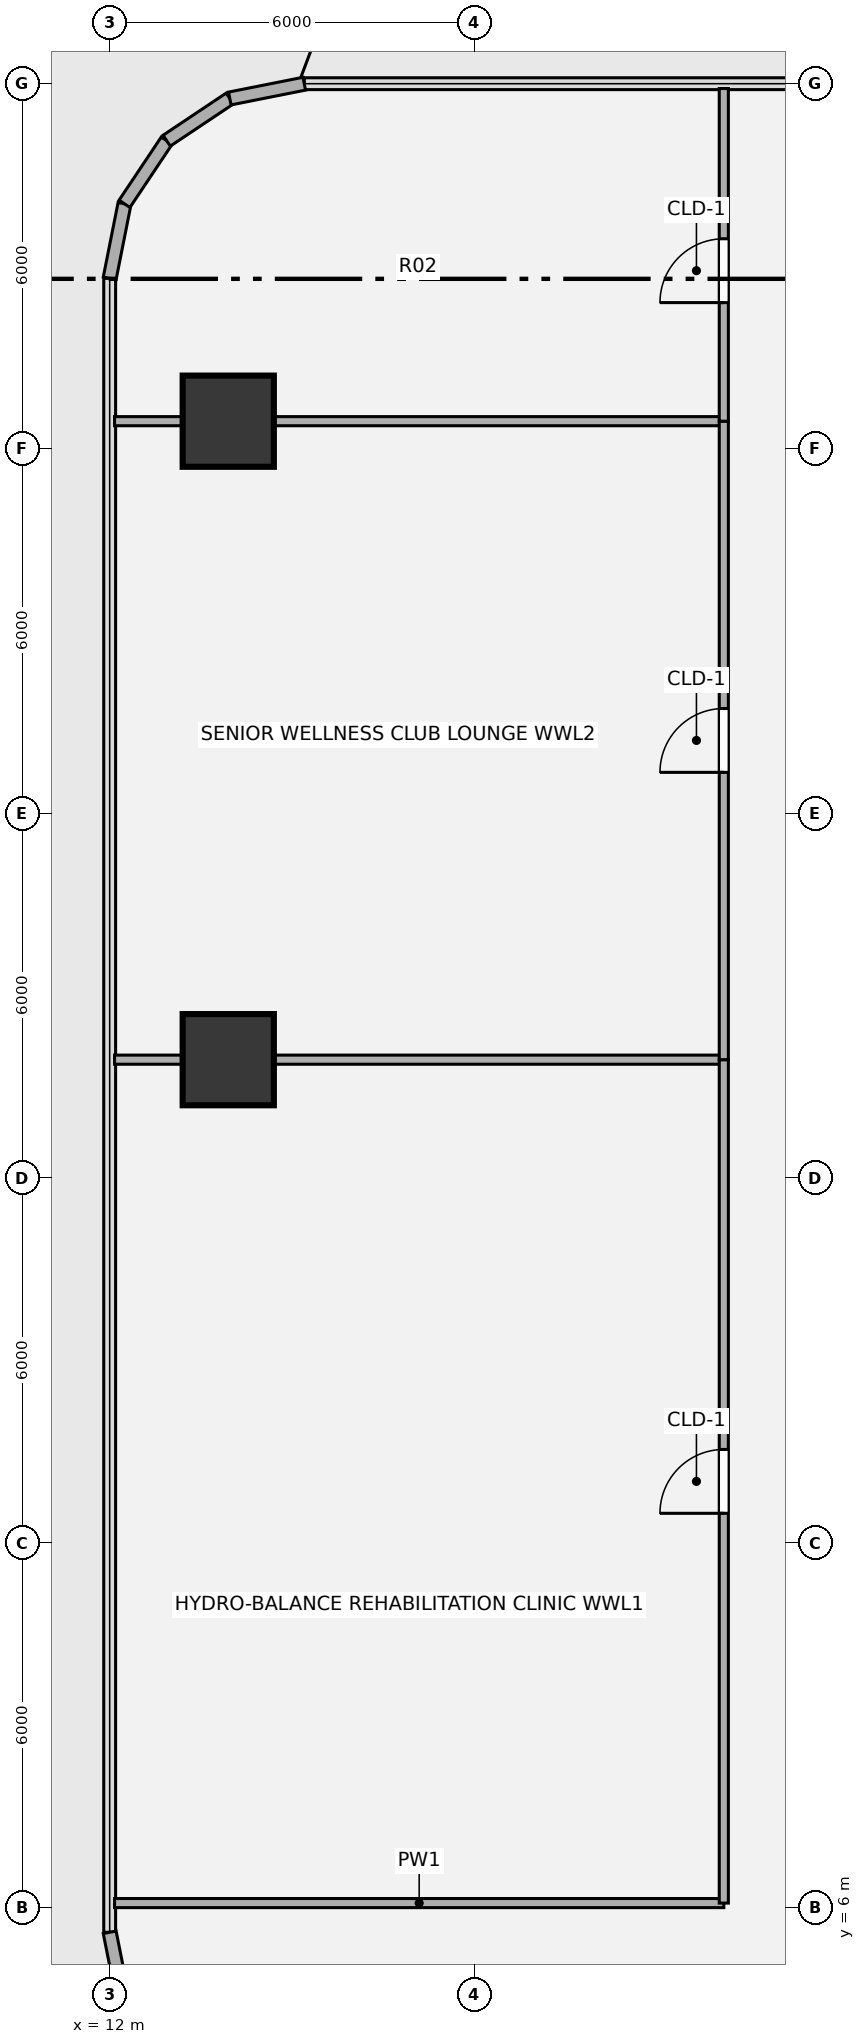
"""IFC4 building model, lengths in metres.
Left out: names, types, materials, properties, quantities, classifications, styles, units other than length and angle.
Written with IfcOpenShell. Run it as: python <this file> out.ifc"""

import sys

from ifc_helpers import new_model, si_unit, direction, frame, frame_2d, origin, origin_2d, place, context, subcontext, project, spatial, rectangle, hollow_circle, extrude, source, transform, mapped, element, fill, save


model = new_model("IFC4")
c1 = context("Model", 3, precision=1e-05, world=origin(), true_north=direction((0.0, 1.0)))
c2 = subcontext(c1, "Body", "Model", "MODEL_VIEW")
j1 = project(units=[si_unit("LENGTHUNIT", "METRE"), si_unit("PLANEANGLEUNIT", "RADIAN")], contexts=[c1])
p1 = place(None, origin())
s1 = spatial("IfcSite", under=j1, at=p1, CompositionType="ELEMENT")
p2 = place(p1, origin())
s2 = spatial("IfcBuilding", under=s1, at=p2, CompositionType="ELEMENT")
p3 = place(p2, frame((0.0, 0.0, 27.0)))
s3 = spatial("IfcBuildingStorey", under=s2, at=p3, CompositionType="ELEMENT", Elevation=27.0)
m1 = source(origin(), c2, "Body", "SweptSolid", [
    extrude(hollow_circle(Radius=0.75, WallThickness=0.05, at=origin_2d()), origin(), (0.0, 0.0, 1.0), 3.78),
])
for number, where, z_axis, x_axis in (
    (1, (13.95, 19.95, 0.0), (0.0, 0.0, 1.0), (1.0, 0.0, 0.0)),
    (2, (13.95, 30.45, 0.0), (0.0, 0.0, 1.0), (1.0, 0.0, 0.0)),
):
    element("IfcColumn", number, at=place(p3, frame(where, z_axis=z_axis, x_axis=x_axis)), inside=s3, PredefinedType="COLUMN", context=c2, shape_type="MappedRepresentation", body=[
        mapped(m1, transform((0.0, 0.0, 0.0), x_axis=(1.0, 0.0, 0.0), y_axis=(0.0, 1.0, 0.0), z_axis=(0.0, 0.0, 1.0), scale=1.0)),
    ])
for number, where, z_axis, x_axis in (
    (3, (12.244, 4.375, 0.0), (0.0, 0.0, 1.0), (-0.195, 0.981, 0.0)),
    (4, (12.0, 32.8, 0.0), (0.0, 0.0, 1.0), (0.195, 0.981, 0.0)),
    (5, (12.244, 34.025, 0.0), (0.0, 0.0, 1.0), (0.556, 0.831, 0.0)),
    (6, (12.937, 35.063, 0.0), (0.0, 0.0, 1.0), (0.831, 0.556, 0.0)),
    (7, (13.975, 35.756, 0.0), (0.0, 0.0, 1.0), (0.981, 0.195, 0.0)),
):
    element("IfcWall", number, at=place(p3, frame(where, z_axis=z_axis, x_axis=x_axis)), inside=s3, PredefinedType="SOLIDWALL", context=c2, shape_type="SweptSolid", body=[
        extrude(rectangle(XDim=1.249, YDim=0.215, at=frame_2d((0.624, 0.0))), origin(), (0.0, 0.0, 1.0), 3.53),
    ])
p4 = place(p3, frame((12.08, 6.08, 0.0), z_axis=(0.0, 0.0, 1.0), x_axis=(1.0, 0.0, 0.0)))
e8 = element("IfcWall", 8, at=p4, inside=s3, PredefinedType="PARTITIONING", context=c2, shape_type="SweptSolid", body=[
    extrude(rectangle(XDim=10.02, YDim=0.15, at=frame_2d((5.01, 0.0))), origin(), (0.0, 0.0, 1.0), 3.5),
])
p5 = place(p3, frame((12.08, 19.95, 0.0), z_axis=(0.0, 0.0, 1.0), x_axis=(1.0, 0.0, 0.0)))
e9 = element("IfcWall", 9, at=p5, inside=s3, PredefinedType="PARTITIONING", context=c2, shape_type="SweptSolid", body=[
    extrude(rectangle(XDim=10.02, YDim=0.15, at=frame_2d((5.01, 0.0))), origin(), (0.0, 0.0, 1.0), 2.715),
])
p6 = place(p3, frame((12.08, 30.45, 0.0), z_axis=(0.0, 0.0, 1.0), x_axis=(1.0, 0.0, 0.0)))
e10 = element("IfcWall", 10, at=p6, inside=s3, PredefinedType="PARTITIONING", context=c2, shape_type="SweptSolid", body=[
    extrude(rectangle(XDim=10.02, YDim=0.15, at=frame_2d((5.01, 0.0))), origin(), (0.0, 0.0, 1.0), 2.903),
])
p7 = place(p3, frame((22.1, 6.08, 0.0), z_axis=(0.0, 0.0, 1.0), x_axis=(0.0, 1.0, 0.0)))
e11 = element("IfcWall", 11, at=p7, inside=s3, PredefinedType="PARTITIONING", context=c2, shape_type="SweptSolid", body=[
    extrude(rectangle(XDim=13.87, YDim=0.15, at=frame_2d((6.935, 0.0))), origin(), (0.0, 0.0, 1.0), 3.5),
])
p8 = place(p7, frame((6.41, 0.0, 0.0)))
e12 = element("IfcOpeningElement", 12, at=p8, cuts=e11, PredefinedType="OPENING", context=c2, shape_type="SweptSolid", body=[
    extrude(rectangle(XDim=1.05, YDim=2.1, at=origin_2d()), frame((0.525, 0.085, 1.05), z_axis=(0.0, -1.0, 0.0), x_axis=(1.0, 0.0, 0.0)), (0.0, 0.0, 1.0), 0.17),
])
p9 = place(p3, frame((22.1, 19.95, 0.0), z_axis=(0.0, 0.0, 1.0), x_axis=(0.0, 1.0, 0.0)))
e13 = element("IfcWall", 13, at=p9, inside=s3, PredefinedType="PARTITIONING", context=c2, shape_type="SweptSolid", body=[
    extrude(rectangle(XDim=10.5, YDim=0.15, at=frame_2d((5.25, 0.0))), origin(), (0.0, 0.0, 1.0), 3.5),
])
p10 = place(p9, frame((4.725, 0.0, 0.0)))
e14 = element("IfcOpeningElement", 14, at=p10, cuts=e13, PredefinedType="OPENING", context=c2, shape_type="SweptSolid", body=[
    extrude(rectangle(XDim=1.05, YDim=2.1, at=origin_2d()), frame((0.525, 0.085, 1.05), z_axis=(0.0, -1.0, 0.0), x_axis=(1.0, 0.0, 0.0)), (0.0, 0.0, 1.0), 0.17),
])
p11 = place(p3, frame((22.1, 30.45, 0.0), z_axis=(0.0, 0.0, 1.0), x_axis=(0.0, 1.0, 0.0)))
e15 = element("IfcWall", 15, at=p11, inside=s3, PredefinedType="PARTITIONING", context=c2, shape_type="SweptSolid", body=[
    extrude(rectangle(XDim=5.471, YDim=0.15, at=frame_2d((2.735, 0.0))), origin(), (0.0, 0.0, 1.0), 3.5),
])
p12 = place(p11, frame((1.95, 0.0, 0.0)))
e16 = element("IfcOpeningElement", 16, at=p12, cuts=e15, PredefinedType="OPENING", context=c2, shape_type="SweptSolid", body=[
    extrude(rectangle(XDim=1.05, YDim=2.1, at=origin_2d()), frame((0.525, 0.085, 1.05), z_axis=(0.0, -1.0, 0.0), x_axis=(1.0, 0.0, 0.0)), (0.0, 0.0, 1.0), 0.17),
])
m2 = source(origin(), c2, "Body", "SweptSolid", [
    extrude(rectangle(XDim=1.05, YDim=2.1, at=origin_2d()), frame((0.525, 0.025, 1.05), z_axis=(0.0, -1.0, 0.0), x_axis=(1.0, 0.0, 0.0)), (0.0, 0.0, 1.0), 0.05),
])
p13 = place(p8, origin())
e17 = element("IfcDoor", 17, at=p13, inside=s3, OperationType="SINGLE_SWING_LEFT", PredefinedType="DOOR", context=c2, shape_type="MappedRepresentation", body=[
    mapped(m2, transform((0.0, 0.0, 0.0), x_axis=(1.0, 0.0, 0.0), y_axis=(0.0, 1.0, 0.0), z_axis=(0.0, 0.0, 1.0), scale=1.0)),
])
fill(e12, e17)
p14 = place(p10, origin())
e18 = element("IfcDoor", 18, at=p14, inside=s3, OperationType="SINGLE_SWING_LEFT", PredefinedType="DOOR", context=c2, shape_type="MappedRepresentation", body=[
    mapped(m2, transform((0.0, 0.0, 0.0), x_axis=(1.0, 0.0, 0.0), y_axis=(0.0, 1.0, 0.0), z_axis=(0.0, 0.0, 1.0), scale=1.0)),
])
fill(e14, e18)
p15 = place(p12, origin())
e19 = element("IfcDoor", 19, at=p15, inside=s3, OperationType="SINGLE_SWING_LEFT", PredefinedType="DOOR", context=c2, shape_type="MappedRepresentation", body=[
    mapped(m2, transform((0.0, 0.0, 0.0), x_axis=(1.0, 0.0, 0.0), y_axis=(0.0, 1.0, 0.0), z_axis=(0.0, 0.0, 1.0), scale=1.0)),
])
fill(e16, e19)
save(model, sys.argv[1])
